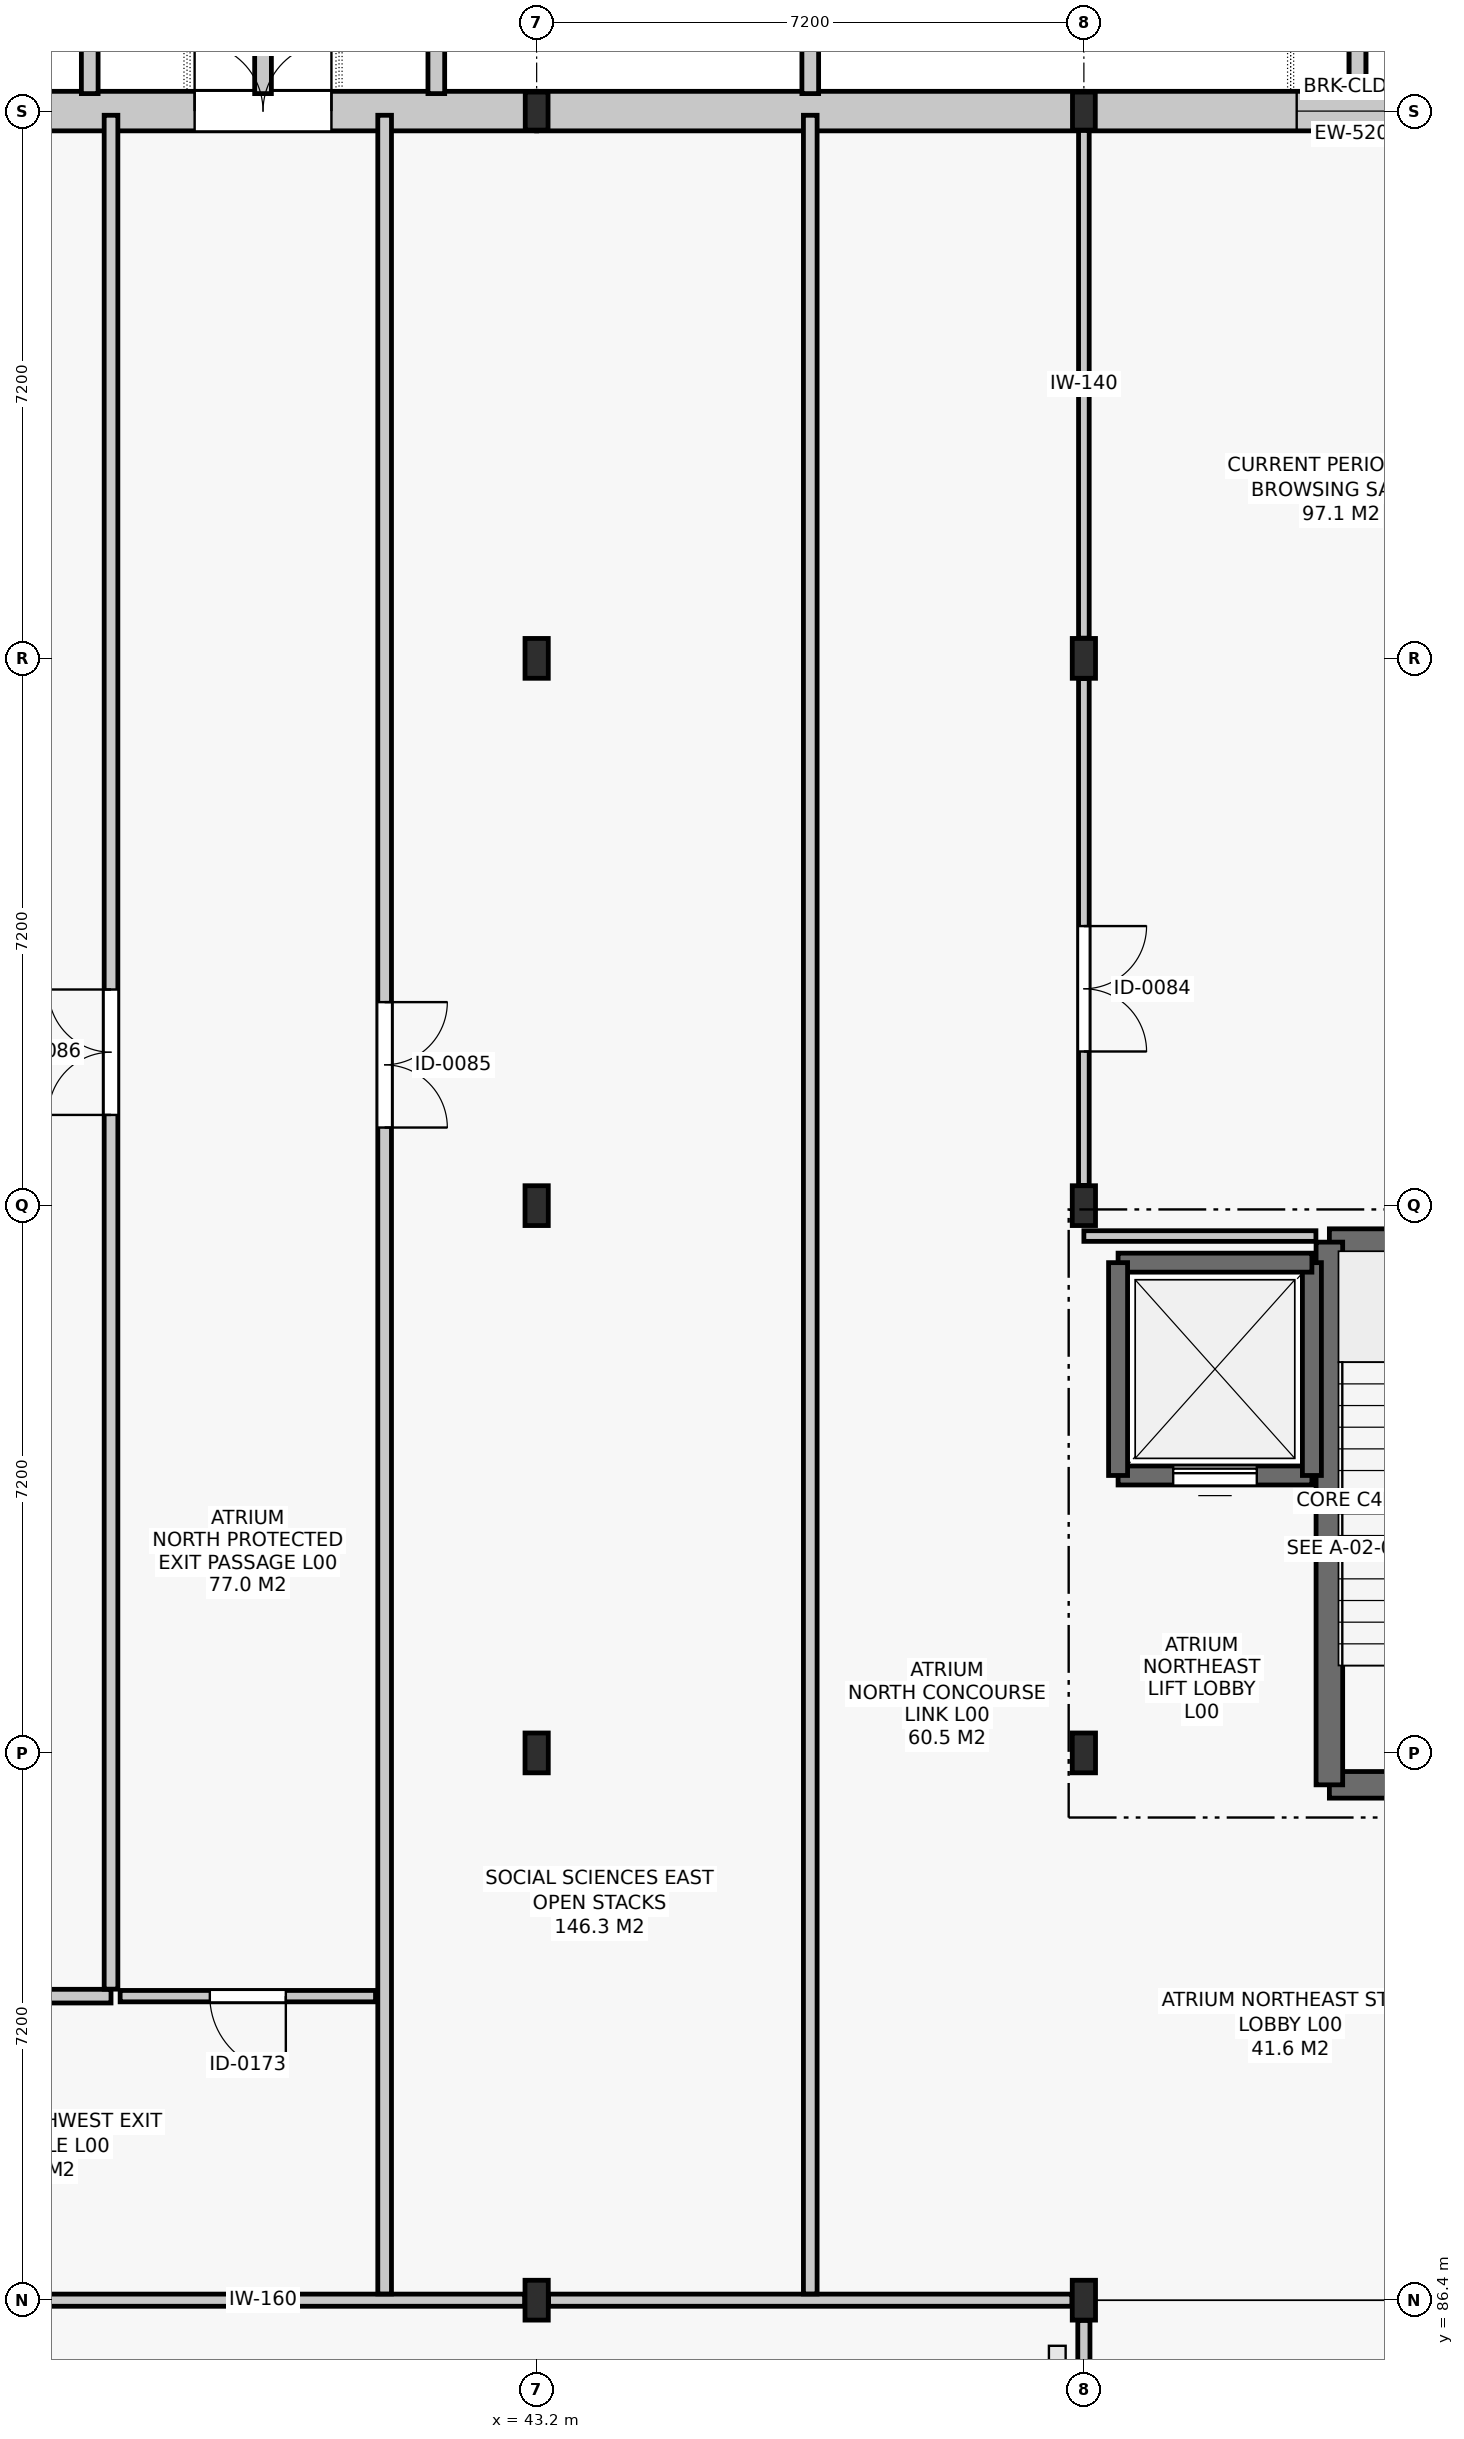
"""IFC4 building model, lengths in metres.
Left out: names, types, materials, properties, quantities, classifications, styles, units other than length and angle.
Written with IfcOpenShell. Run it as: python <this file> out.ifc"""

import sys

from ifc_helpers import new_model, si_unit, direction, frame, frame_2d, origin, origin_2d, place, context, subcontext, project, spatial, rectangle, i_section, extrude, element, fill, save


model = new_model("IFC4")
c1 = context("Model", 3, precision=1e-05, world=origin(), true_north=direction((0.0, 1.0)))
c2 = subcontext(c1, "Body", "Model", "MODEL_VIEW")
j1 = project(units=[si_unit("LENGTHUNIT", "METRE"), si_unit("PLANEANGLEUNIT", "RADIAN")], contexts=[c1])
p1 = place(None, origin())
s1 = spatial("IfcSite", under=j1, at=p1, CompositionType="ELEMENT")
p2 = place(p1, origin())
s2 = spatial("IfcBuilding", under=s1, at=p2, CompositionType="ELEMENT")
p3 = place(p2, origin())
s3 = spatial("IfcBuildingStorey", under=s2, at=p3, CompositionType="ELEMENT", Elevation=0.0)
for number, where, z_axis, x_axis in (
    (1, (43.2, 86.4, 0.0), (0.0, 0.0, 1.0), (1.0, 0.0, 0.0)),
    (2, (43.2, 93.6, 0.0), (0.0, 0.0, 1.0), (1.0, 0.0, 0.0)),
    (3, (43.2, 100.8, 0.0), (0.0, 0.0, 1.0), (1.0, 0.0, 0.0)),
    (4, (43.2, 108.0, 0.0), (0.0, 0.0, 1.0), (1.0, 0.0, 0.0)),
):
    element("IfcColumn", number, at=place(p3, frame(where, z_axis=z_axis, x_axis=x_axis)), inside=s3, PredefinedType="COLUMN", context=c2, shape_type="SweptSolid", body=[
        extrude(i_section(OverallWidth=0.306, OverallDepth=0.524, WebThickness=0.021, FlangeThickness=0.04, FilletRadius=0.027, at=origin_2d()), origin(), (0.0, 0.0, 1.0), 5.4),
    ])
p4 = place(p3, frame((43.2, 115.2, 0.0), z_axis=(0.0, 0.0, 1.0), x_axis=(1.0, 0.0, 0.0)))
e5 = element("IfcColumn", 5, at=p4, inside=s3, PredefinedType="COLUMN", context=c2, shape_type="SweptSolid", body=[
    extrude(i_section(OverallWidth=0.3, OverallDepth=0.5, WebThickness=0.014, FlangeThickness=0.028, FilletRadius=0.027, at=origin_2d()), origin(), (0.0, 0.0, 1.0), 5.4),
])
for number, where, z_axis, x_axis in (
    (6, (50.4, 86.4, 0.0), (0.0, 0.0, 1.0), (1.0, 0.0, 0.0)),
    (7, (50.4, 93.6, 0.0), (0.0, 0.0, 1.0), (1.0, 0.0, 0.0)),
    (8, (50.4, 100.8, 0.0), (0.0, 0.0, 1.0), (1.0, 0.0, 0.0)),
    (9, (50.4, 108.0, 0.0), (0.0, 0.0, 1.0), (1.0, 0.0, 0.0)),
):
    element("IfcColumn", number, at=place(p3, frame(where, z_axis=z_axis, x_axis=x_axis)), inside=s3, PredefinedType="COLUMN", context=c2, shape_type="SweptSolid", body=[
        extrude(i_section(OverallWidth=0.306, OverallDepth=0.524, WebThickness=0.021, FlangeThickness=0.04, FilletRadius=0.027, at=origin_2d()), origin(), (0.0, 0.0, 1.0), 5.4),
    ])
p5 = place(p3, frame((50.4, 115.2, 0.0), z_axis=(0.0, 0.0, 1.0), x_axis=(1.0, 0.0, 0.0)))
e10 = element("IfcColumn", 10, at=p5, inside=s3, PredefinedType="COLUMN", context=c2, shape_type="SweptSolid", body=[
    extrude(i_section(OverallWidth=0.3, OverallDepth=0.5, WebThickness=0.014, FlangeThickness=0.028, FilletRadius=0.027, at=origin_2d()), origin(), (0.0, 0.0, 1.0), 5.4),
])
p6 = place(p3, frame((57.446, 115.2, 0.0), z_axis=(0.0, 0.0, 1.0), x_axis=(-1.0, 0.0, 0.0)))
e11 = element("IfcWall", 11, at=p6, inside=s3, PredefinedType="SOLIDWALL", context=c2, shape_type="SweptSolid", body=[
    extrude(rectangle(XDim=7.046, YDim=0.52, at=frame_2d((3.523, 0.0))), origin(), (0.0, 0.0, 1.0), 4.4),
])
p7 = place(p6, frame((2.646, 0.0, 0.95)))
e12 = element("IfcOpeningElement", 12, at=p7, cuts=e11, PredefinedType="OPENING", context=c2, shape_type="SweptSolid", body=[
    extrude(rectangle(XDim=1.6, YDim=2.2, at=frame_2d((0.8, 1.1))), frame((0.0, 0.272, 0.0), z_axis=(0.0, -1.0, 0.0), x_axis=(1.0, 0.0, 0.0)), (0.0, 0.0, 1.0), 0.544),
])
p8 = place(p3, frame((50.4, 115.2, 0.0), z_axis=(0.0, 0.0, 1.0), x_axis=(-1.0, 0.0, 0.0)))
e13 = element("IfcWall", 13, at=p8, inside=s3, PredefinedType="SOLIDWALL", context=c2, shape_type="SweptSolid", body=[
    extrude(rectangle(XDim=7.2, YDim=0.52, at=frame_2d((3.6, 0.0))), origin(), (0.0, 0.0, 1.0), 4.4),
])
p9 = place(p3, frame((43.2, 115.2, 0.0), z_axis=(0.0, 0.0, 1.0), x_axis=(-1.0, 0.0, 0.0)))
e14 = element("IfcWall", 14, at=p9, inside=s3, PredefinedType="SOLIDWALL", context=c2, shape_type="SweptSolid", body=[
    extrude(rectangle(XDim=7.2, YDim=0.52, at=frame_2d((3.6, 0.0))), origin(), (0.0, 0.0, 1.0), 4.4),
])
p10 = place(p9, frame((2.7, 0.0, 0.0)))
e15 = element("IfcOpeningElement", 15, at=p10, cuts=e14, PredefinedType="OPENING", context=c2, shape_type="SweptSolid", body=[
    extrude(rectangle(XDim=1.8, YDim=2.2, at=frame_2d((0.9, 1.1))), frame((0.0, 0.272, 0.0), z_axis=(0.0, -1.0, 0.0), x_axis=(1.0, 0.0, 0.0)), (0.0, 0.0, 1.0), 0.544),
])
p11 = place(p3, frame((53.63, 93.18, 0.0), z_axis=(0.0, 0.0, 1.0), x_axis=(1.0, 0.0, 0.0)))
e16 = element("IfcWall", 16, at=p11, inside=s3, PredefinedType="SHEAR", context=c2, shape_type="SweptSolid", body=[
    extrude(rectangle(XDim=3.44, YDim=0.35, at=frame_2d((1.72, 0.0))), origin(), (0.0, 0.0, 1.0), 5.12),
])
p12 = place(p11, frame((1.17, 0.0, 0.0)))
e17 = element("IfcOpeningElement", 17, at=p12, cuts=e16, PredefinedType="OPENING", context=c2, shape_type="SweptSolid", body=[
    extrude(rectangle(XDim=1.1, YDim=2.15, at=frame_2d((0.55, 1.075))), frame((0.0, 0.187, 0.0), z_axis=(0.0, -1.0, 0.0), x_axis=(1.0, 0.0, 0.0)), (0.0, 0.0, 1.0), 0.374),
])
p13 = place(p3, frame((57.07, 100.32, 0.0), z_axis=(0.0, 0.0, 1.0), x_axis=(-1.0, 0.0, 0.0)))
e18 = element("IfcWall", 18, at=p13, inside=s3, PredefinedType="SHEAR", context=c2, shape_type="SweptSolid", body=[
    extrude(rectangle(XDim=3.44, YDim=0.35, at=frame_2d((1.72, 0.0))), origin(), (0.0, 0.0, 1.0), 5.12),
])
p14 = place(p3, frame((53.63, 100.32, 0.0), z_axis=(0.0, 0.0, 1.0), x_axis=(0.0, -1.0, 0.0)))
e19 = element("IfcWall", 19, at=p14, inside=s3, PredefinedType="SHEAR", context=c2, shape_type="SweptSolid", body=[
    extrude(rectangle(XDim=7.14, YDim=0.35, at=frame_2d((3.57, 0.0))), origin(), (0.0, 0.0, 1.0), 5.12),
])
p15 = place(p3, frame((50.85, 97.25, 0.0), z_axis=(0.0, 0.0, 1.0), x_axis=(1.0, 0.0, 0.0)))
e20 = element("IfcWall", 20, at=p15, inside=s3, PredefinedType="SHEAR", context=c2, shape_type="SweptSolid", body=[
    extrude(rectangle(XDim=2.55, YDim=0.25, at=frame_2d((1.275, 0.0))), origin(), (0.0, 0.0, 1.0), 5.12),
])
p16 = place(p15, frame((0.725, 0.0, 0.0)))
e21 = element("IfcOpeningElement", 21, at=p16, cuts=e20, PredefinedType="OPENING", context=c2, shape_type="SweptSolid", body=[
    extrude(rectangle(XDim=1.1, YDim=2.1, at=frame_2d((0.55, 1.05))), frame((0.0, 0.137, 0.0), z_axis=(0.0, -1.0, 0.0), x_axis=(1.0, 0.0, 0.0)), (0.0, 0.0, 1.0), 0.274),
])
p17 = place(p3, frame((53.4, 97.25, 0.0), z_axis=(0.0, 0.0, 1.0), x_axis=(0.0, 1.0, 0.0)))
e22 = element("IfcWall", 22, at=p17, inside=s3, PredefinedType="SHEAR", context=c2, shape_type="SweptSolid", body=[
    extrude(rectangle(XDim=2.8, YDim=0.25, at=frame_2d((1.4, 0.0))), origin(), (0.0, 0.0, 1.0), 5.12),
])
p18 = place(p3, frame((53.4, 100.05, 0.0), z_axis=(0.0, 0.0, 1.0), x_axis=(-1.0, 0.0, 0.0)))
e23 = element("IfcWall", 23, at=p18, inside=s3, PredefinedType="SHEAR", context=c2, shape_type="SweptSolid", body=[
    extrude(rectangle(XDim=2.55, YDim=0.25, at=frame_2d((1.275, 0.0))), origin(), (0.0, 0.0, 1.0), 5.12),
])
p19 = place(p3, frame((50.85, 100.05, 0.0), z_axis=(0.0, 0.0, 1.0), x_axis=(0.0, -1.0, 0.0)))
e24 = element("IfcWall", 24, at=p19, inside=s3, PredefinedType="SHEAR", context=c2, shape_type="SweptSolid", body=[
    extrude(rectangle(XDim=2.8, YDim=0.25, at=frame_2d((1.4, 0.0))), origin(), (0.0, 0.0, 1.0), 5.12),
])
for number, where, z_axis, x_axis in (
    (25, (36.157, 86.4, 0.0), (0.0, 0.0, 1.0), (1.0, 0.0, 0.0)),
    (26, (43.357, 86.4, 0.0), (0.0, 0.0, 1.0), (1.0, 0.0, 0.0)),
):
    element("IfcWall", number, at=place(p3, frame(where, z_axis=z_axis, x_axis=x_axis)), inside=s3, PredefinedType="PARTITIONING", context=c2, shape_type="SweptSolid", body=[
        extrude(rectangle(XDim=6.886, YDim=0.16, at=frame_2d((3.443, 0.0))), origin(), (0.0, 0.0, 1.0), 5.105),
    ])
p20 = place(p3, frame((50.4, 100.4, 0.0), z_axis=(0.0, 0.0, 1.0), x_axis=(1.0, 0.0, 0.0)))
e27 = element("IfcWall", 27, at=p20, inside=s3, PredefinedType="PARTITIONING", context=c2, shape_type="SweptSolid", body=[
    extrude(rectangle(XDim=3.053, YDim=0.14, at=frame_2d((1.526, 0.0))), origin(), (0.0, 0.0, 1.0), 4.665),
])
p21 = place(p3, frame((28.855, 90.4, 0.0), z_axis=(0.0, 0.0, 1.0), x_axis=(1.0, 0.0, 0.0)))
e28 = element("IfcWall", 28, at=p21, inside=s3, PredefinedType="PARTITIONING", context=c2, shape_type="SweptSolid", body=[
    extrude(rectangle(XDim=8.745, YDim=0.18, at=frame_2d((4.373, 0.0))), origin(), (0.0, 0.0, 1.0), 4.555),
])
p22 = place(p3, frame((50.4, 79.466, 0.0), z_axis=(0.0, 0.0, 1.0), x_axis=(0.0, 1.0, 0.0)))
e29 = element("IfcWall", 29, at=p22, inside=s3, PredefinedType="PARTITIONING", context=c2, shape_type="SweptSolid", body=[
    extrude(rectangle(XDim=6.668, YDim=0.16, at=frame_2d((3.334, 0.0))), origin(), (0.0, 0.0, 1.0), 5.105),
])
p23 = place(p3, frame((50.4, 101.066, 0.0), z_axis=(0.0, 0.0, 1.0), x_axis=(0.0, 1.0, 0.0)))
e30 = element("IfcWall", 30, at=p23, inside=s3, PredefinedType="PARTITIONING", context=c2, shape_type="SweptSolid", body=[
    extrude(rectangle(XDim=6.668, YDim=0.14, at=frame_2d((3.334, 0.0))), origin(), (0.0, 0.0, 1.0), 4.665),
])
p24 = place(p23, frame((1.762, 0.0, 0.0)))
e31 = element("IfcOpeningElement", 31, at=p24, cuts=e30, PredefinedType="OPENING", context=c2, shape_type="SweptSolid", body=[
    extrude(rectangle(XDim=1.65, YDim=2.25, at=frame_2d((0.825, 1.125))), frame((0.0, 0.082, 0.0), z_axis=(0.0, -1.0, 0.0), x_axis=(1.0, 0.0, 0.0)), (0.0, 0.0, 1.0), 0.164),
])
p25 = place(p3, frame((50.4, 108.266, 0.0), z_axis=(0.0, 0.0, 1.0), x_axis=(0.0, 1.0, 0.0)))
e32 = element("IfcWall", 32, at=p25, inside=s3, PredefinedType="PARTITIONING", context=c2, shape_type="SweptSolid", body=[
    extrude(rectangle(XDim=6.68, YDim=0.14, at=frame_2d((3.34, 0.0))), origin(), (0.0, 0.0, 1.0), 4.665),
])
p26 = place(p3, frame((41.2, 86.482, 0.0), z_axis=(0.0, 0.0, 1.0), x_axis=(0.0, 1.0, 0.0)))
e33 = element("IfcWall", 33, at=p26, inside=s3, PredefinedType="PARTITIONING", context=c2, shape_type="SweptSolid", body=[
    extrude(rectangle(XDim=28.663, YDim=0.18, at=frame_2d((14.332, 0.0))), origin(), (0.0, 0.0, 1.0), 4.555),
])
p27 = place(p26, frame((15.345, 0.0, 0.0)))
e34 = element("IfcOpeningElement", 34, at=p27, cuts=e33, PredefinedType="OPENING", context=c2, shape_type="SweptSolid", body=[
    extrude(rectangle(XDim=1.65, YDim=2.25, at=frame_2d((0.825, 1.125))), frame((0.0, 0.102, 0.0), z_axis=(0.0, -1.0, 0.0), x_axis=(1.0, 0.0, 0.0)), (0.0, 0.0, 1.0), 0.204),
])
p28 = place(p3, frame((46.8, 86.482, 0.0), z_axis=(0.0, 0.0, 1.0), x_axis=(0.0, 1.0, 0.0)))
e35 = element("IfcWall", 35, at=p28, inside=s3, PredefinedType="PARTITIONING", context=c2, shape_type="SweptSolid", body=[
    extrude(rectangle(XDim=28.663, YDim=0.18, at=frame_2d((14.332, 0.0))), origin(), (0.0, 0.0, 1.0), 4.555),
])
p29 = place(p3, frame((37.6, 90.492, 0.0), z_axis=(0.0, 0.0, 1.0), x_axis=(0.0, 1.0, 0.0)))
e36 = element("IfcWall", 36, at=p29, inside=s3, PredefinedType="PARTITIONING", context=c2, shape_type="SweptSolid", body=[
    extrude(rectangle(XDim=24.653, YDim=0.18, at=frame_2d((12.327, 0.0))), origin(), (0.0, 0.0, 1.0), 4.555),
])
p30 = place(p29, frame((11.501, 0.0, 0.0)))
e37 = element("IfcOpeningElement", 37, at=p30, cuts=e36, PredefinedType="OPENING", context=c2, shape_type="SweptSolid", body=[
    extrude(rectangle(XDim=1.65, YDim=2.25, at=frame_2d((0.825, 1.125))), frame((0.0, 0.102, 0.0), z_axis=(0.0, -1.0, 0.0), x_axis=(1.0, 0.0, 0.0)), (0.0, 0.0, 1.0), 0.204),
])
p31 = place(p3, frame((37.72, 90.4, 0.0), z_axis=(0.0, 0.0, 1.0), x_axis=(1.0, 0.0, 0.0)))
e38 = element("IfcWall", 38, at=p31, inside=s3, PredefinedType="PARTITIONING", context=c2, shape_type="SweptSolid", body=[
    extrude(rectangle(XDim=3.36, YDim=0.15, at=frame_2d((1.68, 0.0))), origin(), (0.0, 0.0, 1.0), 5.105),
])
p32 = place(p31, frame((1.18, 0.0, 0.0)))
e39 = element("IfcOpeningElement", 39, at=p32, cuts=e38, PredefinedType="OPENING", context=c2, shape_type="SweptSolid", body=[
    extrude(rectangle(XDim=1.0, YDim=2.15, at=frame_2d((0.5, 1.075))), frame((0.0, 0.087, 0.0), z_axis=(0.0, -1.0, 0.0), x_axis=(1.0, 0.0, 0.0)), (0.0, 0.0, 1.0), 0.174),
])
p33 = place(p7, origin())
e40 = element("IfcWindow", 40, at=p33, inside=s3, PartitioningType="SINGLE_PANEL", PredefinedType="WINDOW", context=c2, shape_type="SweptSolid", body=[
    extrude(rectangle(XDim=1.6, YDim=2.2, at=frame_2d((0.8, 1.1))), frame((0.0, 0.03, 0.0), z_axis=(0.0, -1.0, 0.0), x_axis=(1.0, 0.0, 0.0)), (0.0, 0.0, 1.0), 0.06),
])
fill(e12, e40)
p34 = place(p10, frame((1.8, 0.0, 0.0), z_axis=(0.0, 0.0, 1.0), x_axis=(-1.0, 0.0, 0.0)))
e41 = element("IfcDoor", 41, at=p34, inside=s3, OperationType="DOUBLE_DOOR_SINGLE_SWING", PredefinedType="DOOR", context=c2, shape_type="SweptSolid", body=[
    extrude(rectangle(XDim=1.8, YDim=2.2, at=frame_2d((0.9, 1.1))), frame((0.0, 0.025, 0.0), z_axis=(0.0, -1.0, 0.0), x_axis=(1.0, 0.0, 0.0)), (0.0, 0.0, 1.0), 0.05),
])
fill(e15, e41)
p35 = place(p16, origin())
e42 = element("IfcDoor", 42, at=p35, inside=s3, OperationType="SLIDING_TO_LEFT", PredefinedType="DOOR", context=c2, shape_type="SweptSolid", body=[
    extrude(rectangle(XDim=1.1, YDim=2.1, at=frame_2d((0.55, 1.05))), frame((0.0, 0.025, 0.0), z_axis=(0.0, -1.0, 0.0), x_axis=(1.0, 0.0, 0.0)), (0.0, 0.0, 1.0), 0.05),
])
fill(e21, e42)
p36 = place(p24, frame((1.65, 0.0, 0.0), z_axis=(0.0, 0.0, 1.0), x_axis=(-1.0, 0.0, 0.0)))
e43 = element("IfcDoor", 43, at=p36, inside=s3, OperationType="DOUBLE_DOOR_SINGLE_SWING", PredefinedType="DOOR", context=c2, shape_type="SweptSolid", body=[
    extrude(rectangle(XDim=1.65, YDim=2.25, at=frame_2d((0.825, 1.125))), frame((0.0, 0.025, 0.0), z_axis=(0.0, -1.0, 0.0), x_axis=(1.0, 0.0, 0.0)), (0.0, 0.0, 1.0), 0.05),
])
fill(e31, e43)
p37 = place(p27, frame((1.65, 0.0, 0.0), z_axis=(0.0, 0.0, 1.0), x_axis=(-1.0, 0.0, 0.0)))
e44 = element("IfcDoor", 44, at=p37, inside=s3, OperationType="DOUBLE_DOOR_SINGLE_SWING", PredefinedType="DOOR", context=c2, shape_type="SweptSolid", body=[
    extrude(rectangle(XDim=1.65, YDim=2.25, at=frame_2d((0.825, 1.125))), frame((0.0, 0.025, 0.0), z_axis=(0.0, -1.0, 0.0), x_axis=(1.0, 0.0, 0.0)), (0.0, 0.0, 1.0), 0.05),
])
fill(e34, e44)
p38 = place(p30, origin())
e45 = element("IfcDoor", 45, at=p38, inside=s3, OperationType="DOUBLE_DOOR_SINGLE_SWING", PredefinedType="DOOR", context=c2, shape_type="SweptSolid", body=[
    extrude(rectangle(XDim=1.65, YDim=2.25, at=frame_2d((0.825, 1.125))), frame((0.0, 0.025, 0.0), z_axis=(0.0, -1.0, 0.0), x_axis=(1.0, 0.0, 0.0)), (0.0, 0.0, 1.0), 0.05),
])
fill(e37, e45)
p39 = place(p32, frame((1.0, 0.0, 0.0), z_axis=(0.0, 0.0, 1.0), x_axis=(-1.0, 0.0, 0.0)))
e46 = element("IfcDoor", 46, at=p39, inside=s3, OperationType="SINGLE_SWING_LEFT", PredefinedType="DOOR", context=c2, shape_type="SweptSolid", body=[
    extrude(rectangle(XDim=1.0, YDim=2.15, at=frame_2d((0.5, 1.075))), frame((0.0, 0.025, 0.0), z_axis=(0.0, -1.0, 0.0), x_axis=(1.0, 0.0, 0.0)), (0.0, 0.0, 1.0), 0.05),
])
fill(e39, e46)
save(model, sys.argv[1])
